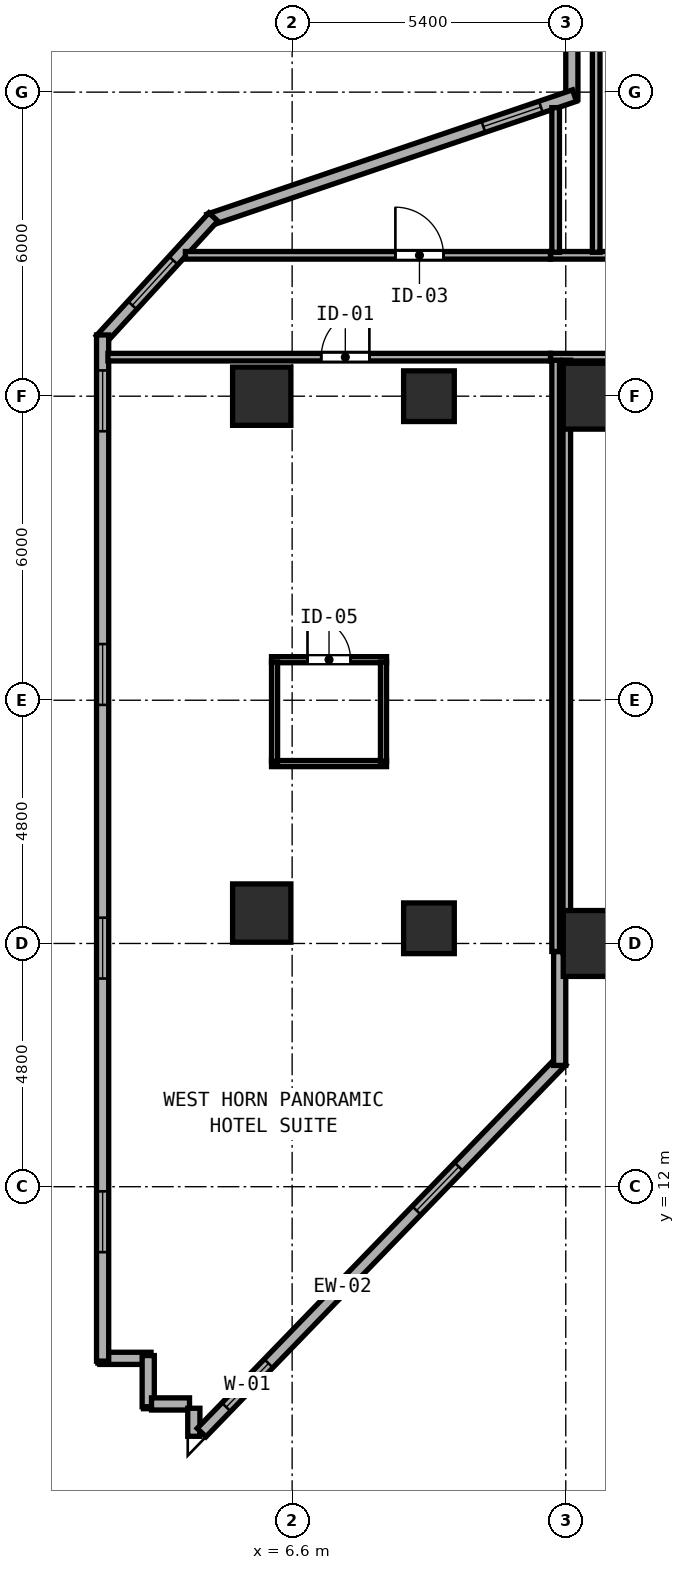
"""IFC4 building model, lengths in metres.
Left out: names, types, materials, properties, quantities, classifications, styles, units other than length and angle.
Written with IfcOpenShell. Run it as: python <this file> out.ifc"""

import sys

from ifc_helpers import new_model, si_unit, direction, frame, frame_2d, origin, origin_2d, place, context, subcontext, project, spatial, rectangle, hollow_rectangle, extrude, element, fill, save


model = new_model("IFC4")
c1 = context("Model", 3, precision=1e-05, world=origin(), true_north=direction((0.0, 1.0)))
c2 = subcontext(c1, "Body", "Model", "MODEL_VIEW")
j1 = project(units=[si_unit("LENGTHUNIT", "METRE"), si_unit("PLANEANGLEUNIT", "RADIAN")], contexts=[c1])
p1 = place(None, origin())
s1 = spatial("IfcSite", under=j1, at=p1, CompositionType="ELEMENT")
p2 = place(p1, origin())
s2 = spatial("IfcBuilding", under=s1, at=p2, CompositionType="ELEMENT")
p3 = place(p2, frame((0.0, 0.0, 35.4)))
s3 = spatial("IfcBuildingStorey", under=s2, at=p3, CompositionType="ELEMENT", Elevation=35.4)
for number, where, z_axis, x_axis in (
    (1, (12.6, 16.8, 0.0), (0.0, 0.0, 1.0), (1.0, 0.0, 0.0)),
    (2, (12.6, 27.6, 0.0), (0.0, 0.0, 1.0), (1.0, 0.0, 0.0)),
):
    element("IfcColumn", number, at=place(p3, frame(where, z_axis=z_axis, x_axis=x_axis)), inside=s3, PredefinedType="COLUMN", context=c2, shape_type="SweptSolid", body=[
        extrude(hollow_rectangle(XDim=1.3, YDim=1.3, WallThickness=0.048, at=origin_2d()), origin(), (0.0, 0.0, 1.0), 3.8),
    ])
for number, where, z_axis, x_axis in (
    (3, (6.0, 17.4, 0.0), (0.0, 0.0, 1.0), (1.0, 0.0, 0.0)),
    (4, (6.0, 27.6, 0.0), (0.0, 0.0, 1.0), (1.0, 0.0, 0.0)),
):
    element("IfcColumn", number, at=place(p3, frame(where, z_axis=z_axis, x_axis=x_axis)), inside=s3, PredefinedType="COLUMN", context=c2, shape_type="SweptSolid", body=[
        extrude(hollow_rectangle(XDim=1.15, YDim=1.15, WallThickness=0.042, at=origin_2d()), origin(), (0.0, 0.0, 1.0), 3.8),
    ])
for number, where, z_axis, x_axis in (
    (5, (9.3, 17.1, 0.0), (0.0, 0.0, 1.0), (1.0, 0.0, 0.0)),
    (6, (9.3, 27.6, 0.0), (0.0, 0.0, 1.0), (1.0, 0.0, 0.0)),
):
    element("IfcColumn", number, at=place(p3, frame(where, z_axis=z_axis, x_axis=x_axis)), inside=s3, PredefinedType="COLUMN", context=c2, shape_type="SweptSolid", body=[
        extrude(hollow_rectangle(XDim=1.0, YDim=1.0, WallThickness=0.038, at=origin_2d()), origin(), (0.0, 0.0, 1.0), 3.8),
    ])
for number, where, z_axis, x_axis in (
    (7, (2.805, 8.613, 0.0), (0.0, 0.0, 1.0), (1.0, 0.0, 0.0)),
    (8, (3.76, 8.668, 0.0), (0.0, 0.0, 1.0), (0.0, -1.0, 0.0)),
):
    element("IfcWall", number, at=place(p3, frame(where, z_axis=z_axis, x_axis=x_axis)), inside=s3, PredefinedType="SOLIDWALL", context=c2, shape_type="SweptSolid", body=[
        extrude(rectangle(XDim=1.01, YDim=0.24, at=frame_2d((0.505, 0.0))), origin(), (0.0, 0.0, 1.0), 3.6),
    ])
p4 = place(p3, frame((3.825, 7.713, 0.0), z_axis=(0.0, 0.0, 1.0), x_axis=(1.0, 0.0, 0.0)))
e9 = element("IfcWall", 9, at=p4, inside=s3, PredefinedType="SOLIDWALL", context=c2, shape_type="SweptSolid", body=[
    extrude(rectangle(XDim=0.75, YDim=0.24, at=frame_2d((0.375, 0.0))), origin(), (0.0, 0.0, 1.0), 3.6),
])
p5 = place(p3, frame((4.66, 7.628, 0.0), z_axis=(0.0, 0.0, 1.0), x_axis=(0.0, -1.0, 0.0)))
e10 = element("IfcWall", 10, at=p5, inside=s3, PredefinedType="SOLIDWALL", context=c2, shape_type="SweptSolid", body=[
    extrude(rectangle(XDim=0.553, YDim=0.24, at=frame_2d((0.277, 0.0))), origin(), (0.0, 0.0, 1.0), 3.6),
])
p6 = place(p3, frame((4.813, 7.148, 0.0), z_axis=(0.0, 0.0, 1.0), x_axis=(0.695506215319, 0.718520079366, 0.0)))
e11 = element("IfcWall", 11, at=p6, inside=s3, PredefinedType="SOLIDWALL", context=c2, shape_type="SweptSolid", body=[
    extrude(rectangle(XDim=10.216, YDim=0.24, at=frame_2d((5.108, 0.0))), origin(), (0.0, 0.0, 1.0), 3.6),
])
p7 = place(p6, frame((0.7, 0.0, 0.85)))
e12 = element("IfcOpeningElement", 12, at=p7, cuts=e11, PredefinedType="OPENING", context=c2, shape_type="SweptSolid", body=[
    extrude(rectangle(XDim=1.2, YDim=1.85, at=frame_2d((0.6, 0.925))), frame((0.0, 0.13, 0.0), z_axis=(0.0, -1.0, 0.0), x_axis=(1.0, 0.0, 0.0)), (0.0, 0.0, 1.0), 0.26),
])
p8 = place(p6, frame((6.1, 0.0, 0.85)))
e13 = element("IfcOpeningElement", 13, at=p8, cuts=e11, PredefinedType="OPENING", context=c2, shape_type="SweptSolid", body=[
    extrude(rectangle(XDim=1.2, YDim=1.85, at=frame_2d((0.6, 0.925))), frame((0.0, 0.13, 0.0), z_axis=(0.0, -1.0, 0.0), x_axis=(1.0, 0.0, 0.0)), (0.0, 0.0, 1.0), 0.26),
])
p9 = place(p3, frame((11.88, 14.394, 0.0), z_axis=(0.0, 0.0, 1.0), x_axis=(0.0, 1.0, 0.0)))
e14 = element("IfcWall", 14, at=p9, inside=s3, PredefinedType="SOLIDWALL", context=c2, shape_type="SweptSolid", body=[
    extrude(rectangle(XDim=2.246, YDim=0.24, at=frame_2d((1.123, 0.0))), origin(), (0.0, 0.0, 1.0), 3.6),
])
p10 = place(p3, frame((12.12, 37.535, 0.0), z_axis=(0.0, 0.0, 1.0), x_axis=(0.0, -1.0, 0.0)))
e15 = element("IfcWall", 15, at=p10, inside=s3, PredefinedType="SOLIDWALL", context=c2, shape_type="SweptSolid", body=[
    extrude(rectangle(XDim=4.076, YDim=0.24, at=frame_2d((2.038, 0.0))), origin(), (0.0, 0.0, 1.0), 3.6),
])
p11 = place(p10, frame((0.7, 0.0, 0.85)))
e16 = element("IfcOpeningElement", 16, at=p11, cuts=e15, PredefinedType="OPENING", context=c2, shape_type="SweptSolid", body=[
    extrude(rectangle(XDim=1.2, YDim=1.85, at=frame_2d((0.6, 0.925))), frame((0.0, 0.13, 0.0), z_axis=(0.0, -1.0, 0.0), x_axis=(1.0, 0.0, 0.0)), (0.0, 0.0, 1.0), 0.26),
])
p12 = place(p3, frame((12.172, 33.532, 0.0), z_axis=(0.0, 0.0, 1.0), x_axis=(-0.946792852546, -0.321843586805, 0.0)))
e17 = element("IfcWall", 17, at=p12, inside=s3, PredefinedType="SOLIDWALL", context=c2, shape_type="SweptSolid", body=[
    extrude(rectangle(XDim=7.622, YDim=0.24, at=frame_2d((3.811, 0.0))), origin(), (0.0, 0.0, 1.0), 3.6),
])
p13 = place(p12, frame((0.7, 0.0, 0.85)))
e18 = element("IfcOpeningElement", 18, at=p13, cuts=e17, PredefinedType="OPENING", context=c2, shape_type="SweptSolid", body=[
    extrude(rectangle(XDim=1.2, YDim=1.85, at=frame_2d((0.6, 0.925))), frame((0.0, 0.13, 0.0), z_axis=(0.0, -1.0, 0.0), x_axis=(1.0, 0.0, 0.0)), (0.0, 0.0, 1.0), 0.26),
])
p14 = place(p3, frame((5.045, 31.137, 0.0), z_axis=(0.0, 0.0, 1.0), x_axis=(-0.675778419356, -0.73710482832, 0.0)))
e19 = element("IfcWall", 19, at=p14, inside=s3, PredefinedType="SOLIDWALL", context=c2, shape_type="SweptSolid", body=[
    extrude(rectangle(XDim=3.288, YDim=0.24, at=frame_2d((1.644, 0.0))), origin(), (0.0, 0.0, 1.0), 3.6),
])
p15 = place(p14, frame((1.165, 0.0, 0.85)))
e20 = element("IfcOpeningElement", 20, at=p15, cuts=e19, PredefinedType="OPENING", context=c2, shape_type="SweptSolid", body=[
    extrude(rectangle(XDim=1.2, YDim=1.85, at=frame_2d((0.6, 0.925))), frame((0.0, 0.13, 0.0), z_axis=(0.0, -1.0, 0.0), x_axis=(1.0, 0.0, 0.0)), (0.0, 0.0, 1.0), 0.26),
])
p16 = place(p3, frame((2.86, 28.808, 0.0), z_axis=(0.0, 0.0, 1.0), x_axis=(0.0, -1.0, 0.0)))
e21 = element("IfcWall", 21, at=p16, inside=s3, PredefinedType="SOLIDWALL", context=c2, shape_type="SweptSolid", body=[
    extrude(rectangle(XDim=20.25, YDim=0.24, at=frame_2d((10.125, 0.0))), origin(), (0.0, 0.0, 1.0), 3.6),
])
p17 = place(p16, frame((0.7, 0.0, 0.85)))
e22 = element("IfcOpeningElement", 22, at=p17, cuts=e21, PredefinedType="OPENING", context=c2, shape_type="SweptSolid", body=[
    extrude(rectangle(XDim=1.2, YDim=1.85, at=frame_2d((0.6, 0.925))), frame((0.0, 0.13, 0.0), z_axis=(0.0, -1.0, 0.0), x_axis=(1.0, 0.0, 0.0)), (0.0, 0.0, 1.0), 0.26),
])
p18 = place(p16, frame((6.1, 0.0, 0.85)))
e23 = element("IfcOpeningElement", 23, at=p18, cuts=e21, PredefinedType="OPENING", context=c2, shape_type="SweptSolid", body=[
    extrude(rectangle(XDim=1.2, YDim=1.85, at=frame_2d((0.6, 0.925))), frame((0.0, 0.13, 0.0), z_axis=(0.0, -1.0, 0.0), x_axis=(1.0, 0.0, 0.0)), (0.0, 0.0, 1.0), 0.26),
])
p19 = place(p16, frame((11.5, 0.0, 0.85)))
e24 = element("IfcOpeningElement", 24, at=p19, cuts=e21, PredefinedType="OPENING", context=c2, shape_type="SweptSolid", body=[
    extrude(rectangle(XDim=1.2, YDim=1.85, at=frame_2d((0.6, 0.925))), frame((0.0, 0.13, 0.0), z_axis=(0.0, -1.0, 0.0), x_axis=(1.0, 0.0, 0.0)), (0.0, 0.0, 1.0), 0.26),
])
p20 = place(p16, frame((16.9, 0.0, 0.85)))
e25 = element("IfcOpeningElement", 25, at=p20, cuts=e21, PredefinedType="OPENING", context=c2, shape_type="SweptSolid", body=[
    extrude(rectangle(XDim=1.2, YDim=1.85, at=frame_2d((0.6, 0.925))), frame((0.0, 0.13, 0.0), z_axis=(0.0, -1.0, 0.0), x_axis=(1.0, 0.0, 0.0)), (0.0, 0.0, 1.0), 0.26),
])
p21 = place(p3, frame((11.7, 30.38, 0.0), z_axis=(0.0, 0.0, 1.0), x_axis=(1.0, 0.0, 0.0)))
e26 = element("IfcWall", 26, at=p21, inside=s3, PredefinedType="PARTITIONING", context=c2, shape_type="SweptSolid", body=[
    extrude(rectangle(XDim=8.25, YDim=0.15, at=frame_2d((4.125, 0.0))), origin(), (0.0, 0.0, 1.0), 3.6),
])
p22 = place(p21, frame((4.434, 0.0, 0.0)))
e27 = element("IfcOpeningElement", 27, at=p22, cuts=e26, PredefinedType="OPENING", context=c2, shape_type="SweptSolid", body=[
    extrude(rectangle(XDim=0.95, YDim=2.18, at=frame_2d((0.475, 1.09))), frame((0.0, 0.085, 0.0), z_axis=(0.0, -1.0, 0.0), x_axis=(1.0, 0.0, 0.0)), (0.0, 0.0, 1.0), 0.17),
])
p23 = place(p3, frame((11.8, 30.44, 0.0), z_axis=(0.0, 0.0, 1.0), x_axis=(0.0, 1.0, 0.0)))
e28 = element("IfcWall", 28, at=p23, inside=s3, PredefinedType="PARTITIONING", context=c2, shape_type="SweptSolid", body=[
    extrude(rectangle(XDim=2.854, YDim=0.15, at=frame_2d((1.427, 0.0))), origin(), (0.0, 0.0, 1.0), 3.6),
])
p24 = place(p3, frame((11.7, 28.37, 0.0), z_axis=(0.0, 0.0, 1.0), x_axis=(1.0, 0.0, 0.0)))
e29 = element("IfcWall", 29, at=p24, inside=s3, PredefinedType="PARTITIONING", context=c2, shape_type="SweptSolid", body=[
    extrude(rectangle(XDim=5.81, YDim=0.15, at=frame_2d((2.905, 0.0))), origin(), (0.0, 0.0, 1.0), 3.6),
])
p25 = place(p24, frame((5.488, 0.0, 0.0), z_axis=(0.0, 0.0, 1.0), x_axis=(-1.0, 0.0, 0.0)))
e30 = element("IfcOpeningElement", 30, at=p25, cuts=e29, PredefinedType="OPENING", context=c2, shape_type="SweptSolid", body=[
    extrude(rectangle(XDim=0.95, YDim=2.18, at=frame_2d((0.475, 1.09))), frame((0.0, 0.085, 0.0), z_axis=(0.0, -1.0, 0.0), x_axis=(1.0, 0.0, 0.0)), (0.0, 0.0, 1.0), 0.17),
])
p26 = place(p3, frame((11.8, 16.642, 0.0), z_axis=(0.0, 0.0, 1.0), x_axis=(0.0, 1.0, 0.0)))
e31 = element("IfcWall", 31, at=p26, inside=s3, PredefinedType="PARTITIONING", context=c2, shape_type="SweptSolid", body=[
    extrude(rectangle(XDim=11.668, YDim=0.15, at=frame_2d((5.834, 0.0))), origin(), (0.0, 0.0, 1.0), 3.6),
])
p27 = place(p3, frame((2.965, 28.37, 0.0), z_axis=(0.0, 0.0, 1.0), x_axis=(1.0, 0.0, 0.0)))
e32 = element("IfcWall", 32, at=p27, inside=s3, PredefinedType="PARTITIONING", context=c2, shape_type="SweptSolid", body=[
    extrude(rectangle(XDim=8.733, YDim=0.15, at=frame_2d((4.366, 0.0))), origin(), (0.0, 0.0, 1.0), 3.6),
])
p28 = place(p27, frame((5.159, 0.0, 0.0), z_axis=(0.0, 0.0, 1.0), x_axis=(-1.0, 0.0, 0.0)))
e33 = element("IfcOpeningElement", 33, at=p28, cuts=e32, PredefinedType="OPENING", context=c2, shape_type="SweptSolid", body=[
    extrude(rectangle(XDim=0.95, YDim=2.18, at=frame_2d((0.475, 1.09))), frame((0.0, 0.085, 0.0), z_axis=(0.0, -1.0, 0.0), x_axis=(1.0, 0.0, 0.0)), (0.0, 0.0, 1.0), 0.17),
])
p29 = place(p3, frame((12.02, 16.612, 0.0), z_axis=(0.0, 0.0, 1.0), x_axis=(0.0, 1.0, 0.0)))
e34 = element("IfcWall", 34, at=p29, inside=s3, PredefinedType="PARTITIONING", context=c2, shape_type="SweptSolid", body=[
    extrude(rectangle(XDim=11.698, YDim=0.15, at=frame_2d((5.849, 0.0))), origin(), (0.0, 0.0, 1.0), 3.6),
])
p30 = place(p3, frame((6.193, 22.4, 0.0), z_axis=(0.0, 0.0, 1.0), x_axis=(1.0, 0.0, 0.0)))
e35 = element("IfcWall", 35, at=p30, inside=s3, PredefinedType="PARTITIONING", context=c2, shape_type="SweptSolid", body=[
    extrude(rectangle(XDim=2.27, YDim=0.12, at=frame_2d((1.135, 0.0))), origin(), (0.0, 0.0, 1.0), 3.6),
])
p31 = place(p30, frame((1.56, 0.0, 0.0), z_axis=(0.0, 0.0, 1.0), x_axis=(-1.0, 0.0, 0.0)))
e36 = element("IfcOpeningElement", 36, at=p31, cuts=e35, PredefinedType="OPENING", context=c2, shape_type="SweptSolid", body=[
    extrude(rectangle(XDim=0.85, YDim=2.1, at=frame_2d((0.425, 1.05))), frame((0.0, 0.07, 0.0), z_axis=(0.0, -1.0, 0.0), x_axis=(1.0, 0.0, 0.0)), (0.0, 0.0, 1.0), 0.14),
])
p32 = place(p3, frame((6.193, 20.35, 0.0), z_axis=(0.0, 0.0, 1.0), x_axis=(1.0, 0.0, 0.0)))
e37 = element("IfcWall", 37, at=p32, inside=s3, PredefinedType="PARTITIONING", context=c2, shape_type="SweptSolid", body=[
    extrude(rectangle(XDim=2.27, YDim=0.12, at=frame_2d((1.135, 0.0))), origin(), (0.0, 0.0, 1.0), 3.6),
])
for number, where, z_axis, x_axis in (
    (38, (6.253, 20.395, 0.0), (0.0, 0.0, 1.0), (0.0, 1.0, 0.0)),
    (39, (8.403, 20.395, 0.0), (0.0, 0.0, 1.0), (0.0, 1.0, 0.0)),
):
    element("IfcWall", number, at=place(p3, frame(where, z_axis=z_axis, x_axis=x_axis)), inside=s3, PredefinedType="PARTITIONING", context=c2, shape_type="SweptSolid", body=[
        extrude(rectangle(XDim=1.96, YDim=0.12, at=frame_2d((0.98, 0.0))), origin(), (0.0, 0.0, 1.0), 3.6),
    ])
p33 = place(p3, frame((4.494, 30.38, 0.0), z_axis=(0.0, 0.0, 1.0), x_axis=(1.0, 0.0, 0.0)))
e40 = element("IfcWall", 40, at=p33, inside=s3, PredefinedType="PARTITIONING", context=c2, shape_type="SweptSolid", body=[
    extrude(rectangle(XDim=7.204, YDim=0.15, at=frame_2d((3.602, 0.0))), origin(), (0.0, 0.0, 1.0), 3.6),
])
p34 = place(p33, frame((4.144, 0.0, 0.0)))
e41 = element("IfcOpeningElement", 41, at=p34, cuts=e40, PredefinedType="OPENING", context=c2, shape_type="SweptSolid", body=[
    extrude(rectangle(XDim=0.95, YDim=2.12, at=frame_2d((0.475, 1.06))), frame((0.0, 0.085, 0.0), z_axis=(0.0, -1.0, 0.0), x_axis=(1.0, 0.0, 0.0)), (0.0, 0.0, 1.0), 0.17),
])
p35 = place(p3, frame((12.6, 30.44, 0.0), z_axis=(0.0, 0.0, 1.0), x_axis=(0.0, 1.0, 0.0)))
e42 = element("IfcWall", 42, at=p35, inside=s3, PredefinedType="PARTITIONING", context=c2, shape_type="SweptSolid", body=[
    extrude(rectangle(XDim=4.1, YDim=0.15, at=frame_2d((2.05, 0.0))), origin(), (0.0, 0.0, 1.0), 3.6),
])
p36 = place(p7, origin())
e43 = element("IfcWindow", 43, at=p36, inside=s3, PartitioningType="SINGLE_PANEL", PredefinedType="WINDOW", context=c2, shape_type="SweptSolid", body=[
    extrude(rectangle(XDim=1.2, YDim=1.85, at=frame_2d((0.6, 0.925))), frame((0.0, 0.03, 0.0), z_axis=(0.0, -1.0, 0.0), x_axis=(1.0, 0.0, 0.0)), (0.0, 0.0, 1.0), 0.06),
])
fill(e12, e43)
p37 = place(p8, origin())
e44 = element("IfcWindow", 44, at=p37, inside=s3, PartitioningType="SINGLE_PANEL", PredefinedType="WINDOW", context=c2, shape_type="SweptSolid", body=[
    extrude(rectangle(XDim=1.2, YDim=1.85, at=frame_2d((0.6, 0.925))), frame((0.0, 0.03, 0.0), z_axis=(0.0, -1.0, 0.0), x_axis=(1.0, 0.0, 0.0)), (0.0, 0.0, 1.0), 0.06),
])
fill(e13, e44)
p38 = place(p13, origin())
e45 = element("IfcWindow", 45, at=p38, inside=s3, PartitioningType="SINGLE_PANEL", PredefinedType="WINDOW", context=c2, shape_type="SweptSolid", body=[
    extrude(rectangle(XDim=1.2, YDim=1.85, at=frame_2d((0.6, 0.925))), frame((0.0, 0.03, 0.0), z_axis=(0.0, -1.0, 0.0), x_axis=(1.0, 0.0, 0.0)), (0.0, 0.0, 1.0), 0.06),
])
fill(e18, e45)
p39 = place(p15, origin())
e46 = element("IfcWindow", 46, at=p39, inside=s3, PartitioningType="SINGLE_PANEL", PredefinedType="WINDOW", context=c2, shape_type="SweptSolid", body=[
    extrude(rectangle(XDim=1.2, YDim=1.85, at=frame_2d((0.6, 0.925))), frame((0.0, 0.03, 0.0), z_axis=(0.0, -1.0, 0.0), x_axis=(1.0, 0.0, 0.0)), (0.0, 0.0, 1.0), 0.06),
])
fill(e20, e46)
p40 = place(p17, origin())
e47 = element("IfcWindow", 47, at=p40, inside=s3, PartitioningType="SINGLE_PANEL", PredefinedType="WINDOW", context=c2, shape_type="SweptSolid", body=[
    extrude(rectangle(XDim=1.2, YDim=1.85, at=frame_2d((0.6, 0.925))), frame((0.0, 0.03, 0.0), z_axis=(0.0, -1.0, 0.0), x_axis=(1.0, 0.0, 0.0)), (0.0, 0.0, 1.0), 0.06),
])
fill(e22, e47)
p41 = place(p18, origin())
e48 = element("IfcWindow", 48, at=p41, inside=s3, PartitioningType="SINGLE_PANEL", PredefinedType="WINDOW", context=c2, shape_type="SweptSolid", body=[
    extrude(rectangle(XDim=1.2, YDim=1.85, at=frame_2d((0.6, 0.925))), frame((0.0, 0.03, 0.0), z_axis=(0.0, -1.0, 0.0), x_axis=(1.0, 0.0, 0.0)), (0.0, 0.0, 1.0), 0.06),
])
fill(e23, e48)
p42 = place(p19, origin())
e49 = element("IfcWindow", 49, at=p42, inside=s3, PartitioningType="SINGLE_PANEL", PredefinedType="WINDOW", context=c2, shape_type="SweptSolid", body=[
    extrude(rectangle(XDim=1.2, YDim=1.85, at=frame_2d((0.6, 0.925))), frame((0.0, 0.03, 0.0), z_axis=(0.0, -1.0, 0.0), x_axis=(1.0, 0.0, 0.0)), (0.0, 0.0, 1.0), 0.06),
])
fill(e24, e49)
p43 = place(p20, origin())
e50 = element("IfcWindow", 50, at=p43, inside=s3, PartitioningType="SINGLE_PANEL", PredefinedType="WINDOW", context=c2, shape_type="SweptSolid", body=[
    extrude(rectangle(XDim=1.2, YDim=1.85, at=frame_2d((0.6, 0.925))), frame((0.0, 0.03, 0.0), z_axis=(0.0, -1.0, 0.0), x_axis=(1.0, 0.0, 0.0)), (0.0, 0.0, 1.0), 0.06),
])
fill(e25, e50)
p44 = place(p28, origin())
e51 = element("IfcDoor", 51, at=p44, inside=s3, OperationType="SINGLE_SWING_LEFT", PredefinedType="DOOR", context=c2, shape_type="SweptSolid", body=[
    extrude(rectangle(XDim=0.95, YDim=2.18, at=frame_2d((0.475, 1.09))), frame((0.0, 0.025, 0.0), z_axis=(0.0, -1.0, 0.0), x_axis=(1.0, 0.0, 0.0)), (0.0, 0.0, 1.0), 0.05),
])
fill(e33, e51)
p45 = place(p31, origin())
e52 = element("IfcDoor", 52, at=p45, inside=s3, OperationType="SINGLE_SWING_RIGHT", PredefinedType="DOOR", context=c2, shape_type="SweptSolid", body=[
    extrude(rectangle(XDim=0.85, YDim=2.1, at=frame_2d((0.425, 1.05))), frame((0.0, 0.025, 0.0), z_axis=(0.0, -1.0, 0.0), x_axis=(1.0, 0.0, 0.0)), (0.0, 0.0, 1.0), 0.05),
])
fill(e36, e52)
p46 = place(p34, origin())
e53 = element("IfcDoor", 53, at=p46, inside=s3, OperationType="SINGLE_SWING_LEFT", PredefinedType="DOOR", context=c2, shape_type="SweptSolid", body=[
    extrude(rectangle(XDim=0.95, YDim=2.12, at=frame_2d((0.475, 1.06))), frame((0.0, 0.025, 0.0), z_axis=(0.0, -1.0, 0.0), x_axis=(1.0, 0.0, 0.0)), (0.0, 0.0, 1.0), 0.05),
])
fill(e41, e53)
save(model, sys.argv[1])
